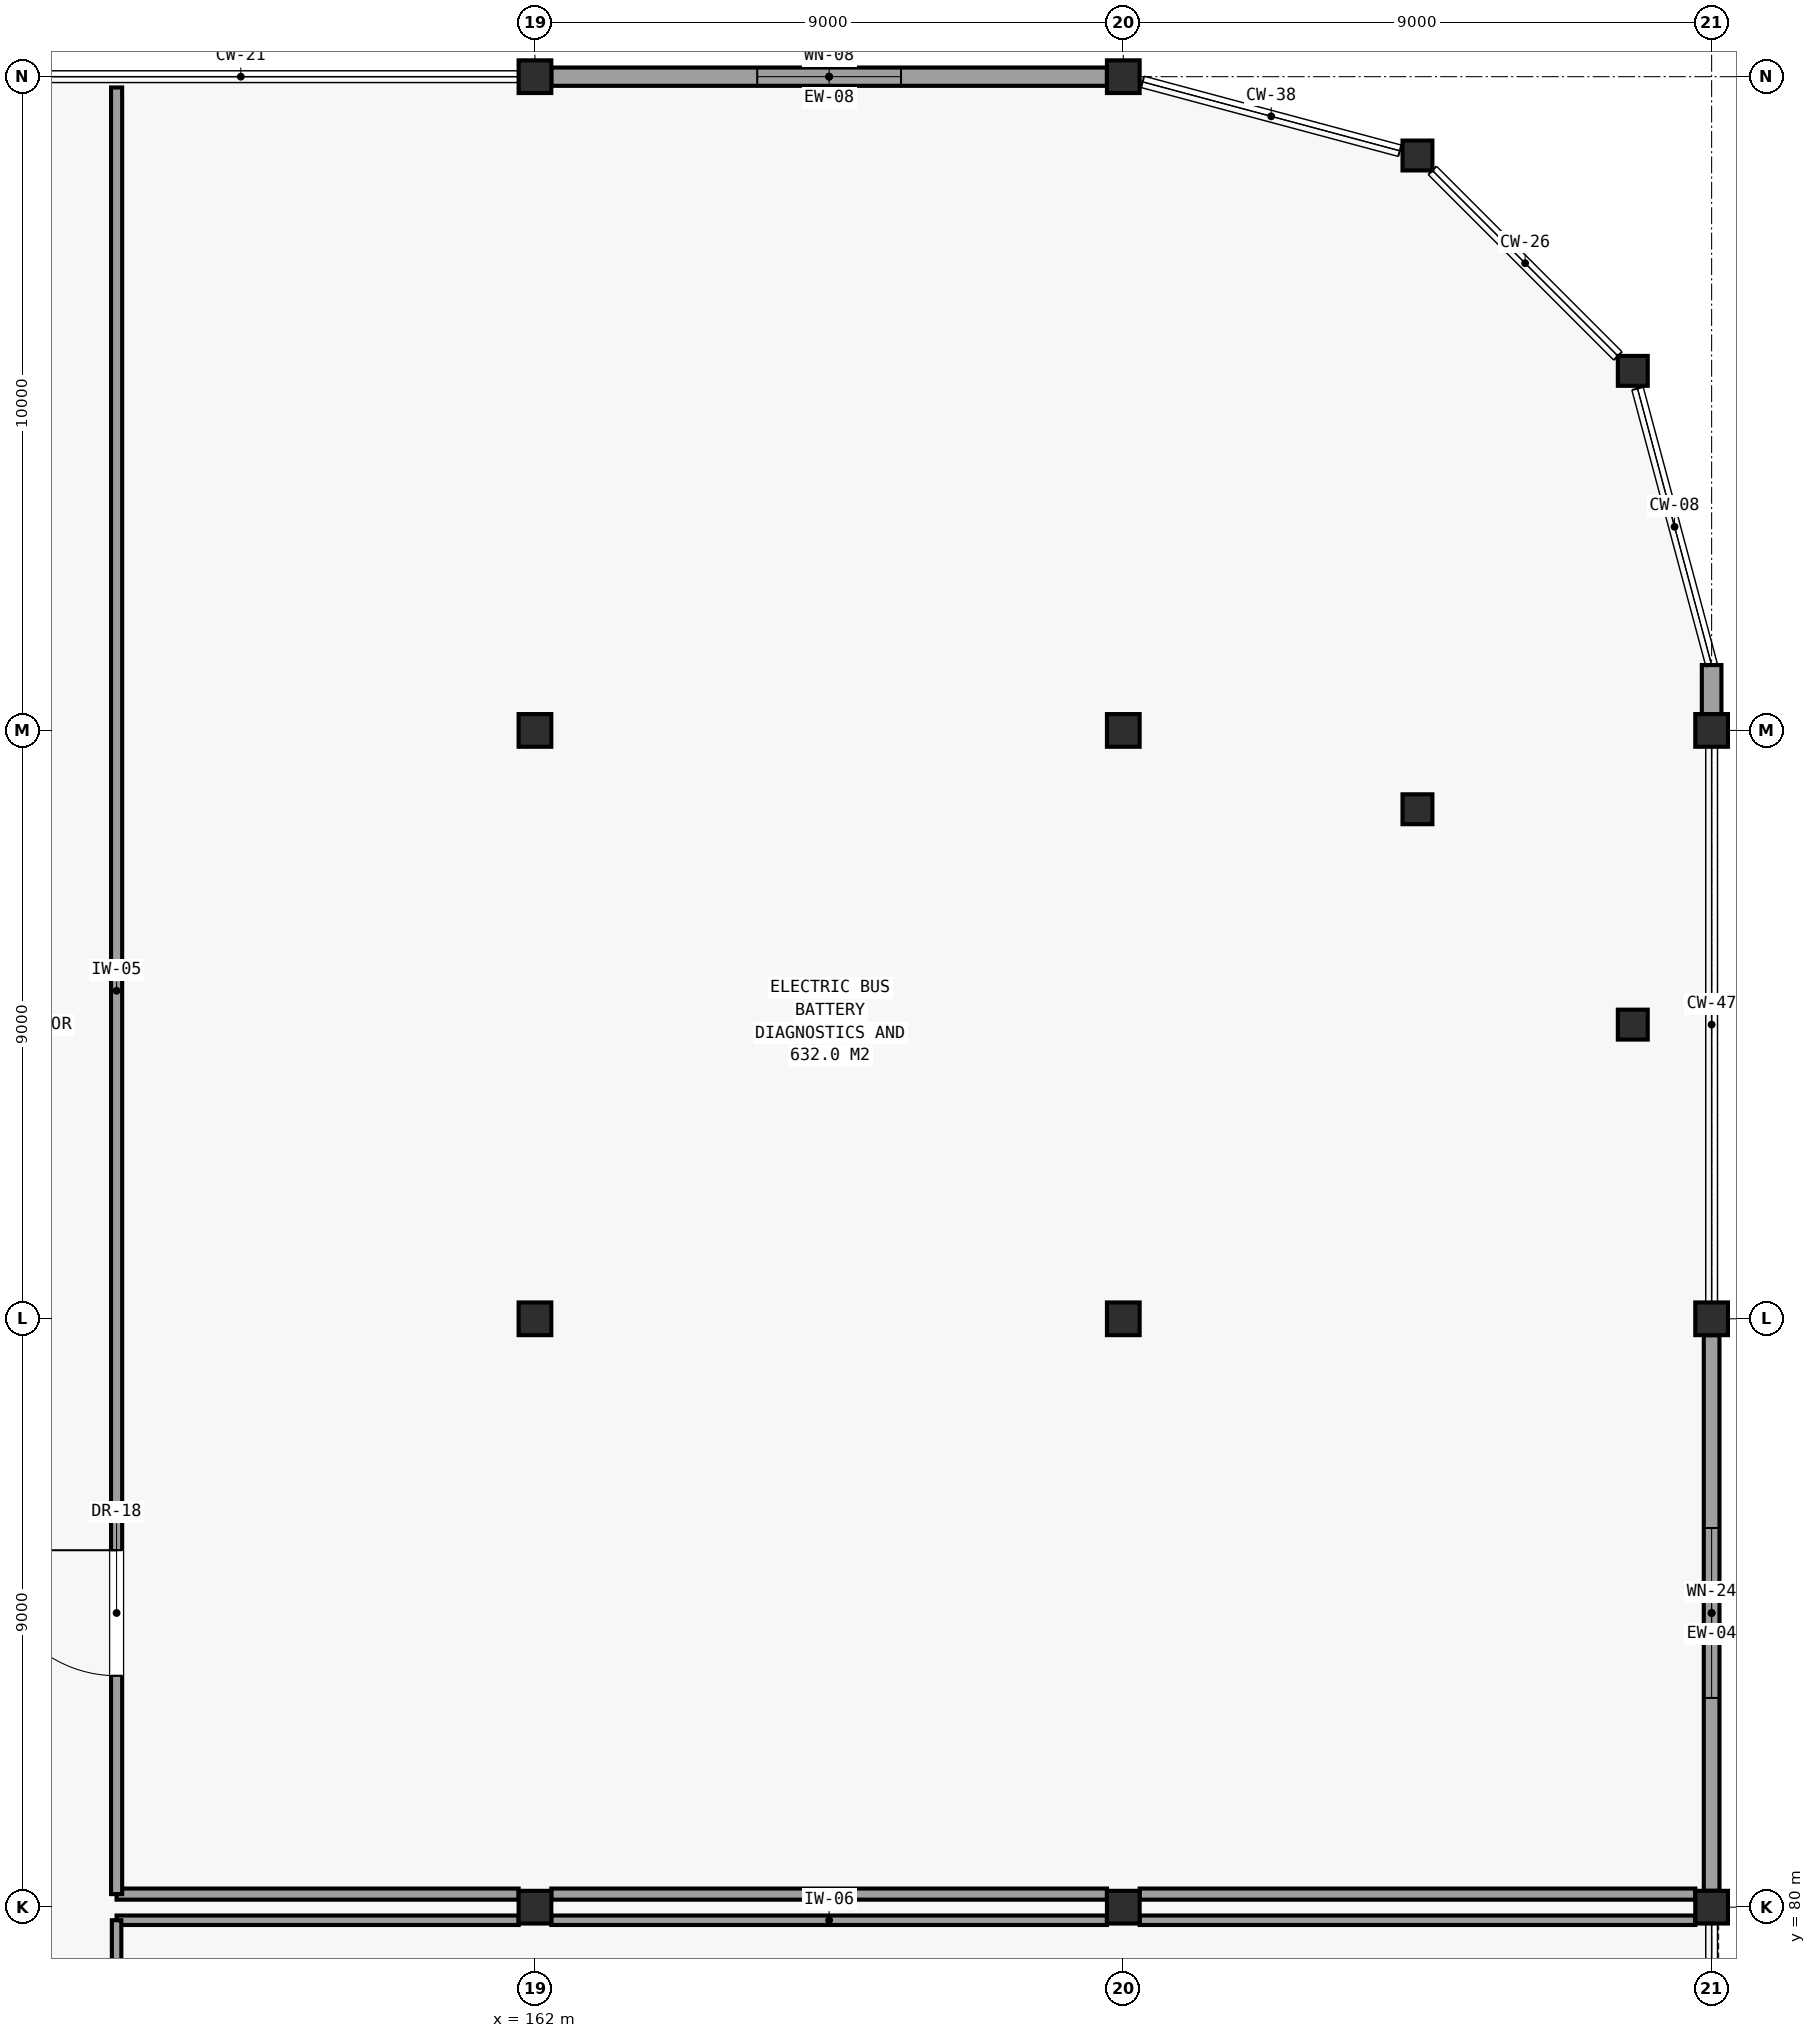
"""IFC4 building model, lengths in metres.
Left out: names, types, materials, properties, quantities, classifications, styles, units other than length and angle.
Written with IfcOpenShell. Run it as: python <this file> out.ifc"""

import sys

from ifc_helpers import new_model, si_unit, direction, frame, frame_2d, origin, origin_2d, place, context, subcontext, project, spatial, rectangle, hollow_rectangle, hollow_circle, extrude, element, fill, save


model = new_model("IFC4")
c1 = context("Model", 3, precision=1e-05, world=origin(), true_north=direction((0.0, 1.0)))
c2 = subcontext(c1, "Body", "Model", "MODEL_VIEW")
j1 = project(units=[si_unit("LENGTHUNIT", "METRE"), si_unit("PLANEANGLEUNIT", "RADIAN")], contexts=[c1])
p1 = place(None, origin())
s1 = spatial("IfcSite", under=j1, at=p1, CompositionType="ELEMENT")
p2 = place(p1, origin())
s2 = spatial("IfcBuilding", under=s1, at=p2, CompositionType="ELEMENT")
p3 = place(p2, origin())
s3 = spatial("IfcBuildingStorey", under=s2, at=p3, CompositionType="ELEMENT", Elevation=0.0)
for number, where, z_axis, x_axis in (
    (1, (162.0, 80.0, 0.0), (0.0, 0.0, 1.0), (1.0, 0.0, 0.0)),
    (2, (162.0, 89.0, 0.0), (0.0, 0.0, 1.0), (1.0, 0.0, 0.0)),
    (3, (162.0, 98.0, 0.0), (0.0, 0.0, 1.0), (1.0, 0.0, 0.0)),
    (4, (162.0, 108.0, 0.0), (0.0, 0.0, 1.0), (1.0, 0.0, 0.0)),
    (5, (171.0, 80.0, 0.0), (0.0, 0.0, 1.0), (1.0, 0.0, 0.0)),
    (6, (171.0, 89.0, 0.0), (0.0, 0.0, 1.0), (1.0, 0.0, 0.0)),
    (7, (171.0, 98.0, 0.0), (0.0, 0.0, 1.0), (1.0, 0.0, 0.0)),
    (8, (171.0, 108.0, 0.0), (0.0, 0.0, 1.0), (1.0, 0.0, 0.0)),
):
    element("IfcColumn", number, at=place(p3, frame(where, z_axis=z_axis, x_axis=x_axis)), inside=s3, PredefinedType="COLUMN", context=c2, shape_type="SweptSolid", body=[
        extrude(hollow_rectangle(XDim=0.5, YDim=0.5, WallThickness=0.025, at=origin_2d()), origin(), (0.0, 0.0, 1.0), 5.1),
    ])
for number, where, z_axis, x_axis in (
    (9, (175.5, 96.794, 0.0), (0.0, 0.0, 1.0), (1.0, 0.0, 0.0)),
    (10, (175.5, 106.794, 0.0), (0.0, 0.0, 1.0), (1.0, 0.0, 0.0)),
    (11, (178.794, 93.5, 0.0), (0.0, 0.0, 1.0), (1.0, 0.0, 0.0)),
    (12, (178.794, 103.5, 0.0), (0.0, 0.0, 1.0), (1.0, 0.0, 0.0)),
):
    element("IfcColumn", number, at=place(p3, frame(where, z_axis=z_axis, x_axis=x_axis)), inside=s3, PredefinedType="COLUMN", context=c2, shape_type="SweptSolid", body=[
        extrude(hollow_circle(Radius=0.229, WallThickness=0.016, at=origin_2d()), origin(), (0.0, 0.0, 1.0), 5.1),
    ])
for number, where, z_axis, x_axis in (
    (13, (180.0, 80.0, 0.0), (0.0, 0.0, 1.0), (1.0, 0.0, 0.0)),
    (14, (180.0, 89.0, 0.0), (0.0, 0.0, 1.0), (1.0, 0.0, 0.0)),
    (15, (180.0, 98.0, 0.0), (0.0, 0.0, 1.0), (1.0, 0.0, 0.0)),
):
    element("IfcColumn", number, at=place(p3, frame(where, z_axis=z_axis, x_axis=x_axis)), inside=s3, PredefinedType="COLUMN", context=c2, shape_type="SweptSolid", body=[
        extrude(hollow_rectangle(XDim=0.5, YDim=0.5, WallThickness=0.025, at=origin_2d()), origin(), (0.0, 0.0, 1.0), 5.1),
    ])
p4 = place(p3, frame((180.0, 80.25, 0.0), z_axis=(0.0, 0.0, 1.0), x_axis=(0.0, 1.0, 0.0)))
e16 = element("IfcWall", 16, at=p4, inside=s3, PredefinedType="SOLIDWALL", context=c2, shape_type="SweptSolid", body=[
    extrude(rectangle(XDim=8.5, YDim=0.24, at=frame_2d((4.25, 0.0))), origin(), (0.0, 0.0, 1.0), 4.44),
])
p5 = place(p4, frame((2.95, 0.0, 0.95)))
e17 = element("IfcOpeningElement", 17, at=p5, cuts=e16, PredefinedType="OPENING", context=c2, shape_type="SweptSolid", body=[
    extrude(rectangle(XDim=2.6, YDim=1.9, at=frame_2d((1.3, 0.95))), frame((0.0, 0.131, 0.0), z_axis=(0.0, -1.0, 0.0), x_axis=(1.0, 0.0, 0.0)), (0.0, 0.0, 1.0), 0.262),
])
p6 = place(p3, frame((180.0, 98.25, 0.0), z_axis=(0.0, 0.0, 1.0), x_axis=(0.0, 1.0, 0.0)))
e18 = element("IfcWall", 18, at=p6, inside=s3, PredefinedType="SOLIDWALL", context=c2, shape_type="SweptSolid", body=[
    extrude(rectangle(XDim=0.75, YDim=0.3, at=frame_2d((0.375, 0.0))), origin(), (0.0, 0.0, 1.0), 4.84),
])
p7 = place(p3, frame((170.75, 108.0, 0.0), z_axis=(0.0, 0.0, 1.0), x_axis=(-1.0, 0.0, 0.0)))
e19 = element("IfcWall", 19, at=p7, inside=s3, PredefinedType="SOLIDWALL", context=c2, shape_type="SweptSolid", body=[
    extrude(rectangle(XDim=8.5, YDim=0.28, at=frame_2d((4.25, 0.0))), origin(), (0.0, 0.0, 1.0), 4.252),
])
p8 = place(p7, frame((3.15, 0.0, 0.95)))
e20 = element("IfcOpeningElement", 20, at=p8, cuts=e19, PredefinedType="OPENING", context=c2, shape_type="SweptSolid", body=[
    extrude(rectangle(XDim=2.2, YDim=1.8, at=frame_2d((1.1, 0.9))), frame((0.0, 0.151, 0.0), z_axis=(0.0, -1.0, 0.0), x_axis=(1.0, 0.0, 0.0)), (0.0, 0.0, 1.0), 0.302),
])
p9 = place(p3, frame((155.6, 79.8, 0.0), z_axis=(0.0, 0.0, 1.0), x_axis=(1.0, 0.0, 0.0)))
e21 = element("IfcWall", 21, at=p9, inside=s3, PredefinedType="PARTITIONING", context=c2, shape_type="SweptSolid", body=[
    extrude(rectangle(XDim=6.15, YDim=0.145, at=frame_2d((3.075, 0.0))), origin(), (0.0, 0.0, 1.0), 4.19),
])
for number, where, z_axis, x_axis in (
    (22, (162.25, 79.8, 0.0), (0.0, 0.0, 1.0), (1.0, 0.0, 0.0)),
    (23, (171.25, 79.8, 0.0), (0.0, 0.0, 1.0), (1.0, 0.0, 0.0)),
):
    element("IfcWall", number, at=place(p3, frame(where, z_axis=z_axis, x_axis=x_axis)), inside=s3, PredefinedType="PARTITIONING", context=c2, shape_type="SweptSolid", body=[
        extrude(rectangle(XDim=8.5, YDim=0.145, at=frame_2d((4.25, 0.0))), origin(), (0.0, 0.0, 1.0), 4.19),
    ])
p10 = place(p3, frame((155.6, 62.2, 0.0), z_axis=(0.0, 0.0, 1.0), x_axis=(0.0, 1.0, 0.0)))
e24 = element("IfcWall", 24, at=p10, inside=s3, PredefinedType="PARTITIONING", context=c2, shape_type="SweptSolid", body=[
    extrude(rectangle(XDim=17.6, YDim=0.145, at=frame_2d((8.8, 0.0))), origin(), (0.0, 0.0, 1.0), 4.252),
])
p11 = place(p10, frame((12.39, 0.0, 0.0)))
e25 = element("IfcOpeningElement", 25, at=p11, cuts=e24, PredefinedType="OPENING", context=c2, shape_type="SweptSolid", body=[
    extrude(rectangle(XDim=1.82, YDim=2.45, at=frame_2d((0.91, 1.225))), frame((0.0, 0.083, 0.0), z_axis=(0.0, -1.0, 0.0), x_axis=(1.0, 0.0, 0.0)), (0.0, 0.0, 1.0), 0.167),
])
p12 = place(p3, frame((155.6, 80.2, 0.0), z_axis=(0.0, 0.0, 1.0), x_axis=(1.0, 0.0, 0.0)))
e26 = element("IfcWall", 26, at=p12, inside=s3, PredefinedType="PARTITIONING", context=c2, shape_type="SweptSolid", body=[
    extrude(rectangle(XDim=6.15, YDim=0.17, at=frame_2d((3.075, 0.0))), origin(), (0.0, 0.0, 1.0), 4.19),
])
for number, where, z_axis, x_axis in (
    (27, (162.25, 80.2, 0.0), (0.0, 0.0, 1.0), (1.0, 0.0, 0.0)),
    (28, (171.25, 80.2, 0.0), (0.0, 0.0, 1.0), (1.0, 0.0, 0.0)),
):
    element("IfcWall", number, at=place(p3, frame(where, z_axis=z_axis, x_axis=x_axis)), inside=s3, PredefinedType="PARTITIONING", context=c2, shape_type="SweptSolid", body=[
        extrude(rectangle(XDim=8.5, YDim=0.17, at=frame_2d((4.25, 0.0))), origin(), (0.0, 0.0, 1.0), 4.19),
    ])
p13 = place(p3, frame((155.6, 80.2, 0.0), z_axis=(0.0, 0.0, 1.0), x_axis=(0.0, 1.0, 0.0)))
e29 = element("IfcWall", 29, at=p13, inside=s3, PredefinedType="PARTITIONING", context=c2, shape_type="SweptSolid", body=[
    extrude(rectangle(XDim=27.635, YDim=0.17, at=frame_2d((13.817, 0.0))), origin(), (0.0, 0.0, 1.0), 4.252),
])
p14 = place(p13, frame((3.34, 0.0, 0.0)))
e30 = element("IfcOpeningElement", 30, at=p14, cuts=e29, PredefinedType="OPENING", context=c2, shape_type="SweptSolid", body=[
    extrude(rectangle(XDim=1.92, YDim=2.45, at=frame_2d((0.96, 1.225))), frame((0.0, 0.096, 0.0), z_axis=(0.0, -1.0, 0.0), x_axis=(1.0, 0.0, 0.0)), (0.0, 0.0, 1.0), 0.192),
])
p15 = place(p5, origin())
e31 = element("IfcWindow", 31, at=p15, inside=s3, PartitioningType="SINGLE_PANEL", PredefinedType="WINDOW", context=c2, shape_type="SweptSolid", body=[
    extrude(rectangle(XDim=2.6, YDim=1.9, at=frame_2d((1.3, 0.95))), frame((0.0, 0.03, 0.0), z_axis=(0.0, -1.0, 0.0), x_axis=(1.0, 0.0, 0.0)), (0.0, 0.0, 1.0), 0.06),
])
fill(e17, e31)
p16 = place(p8, origin())
e32 = element("IfcWindow", 32, at=p16, inside=s3, PartitioningType="SINGLE_PANEL", PredefinedType="WINDOW", context=c2, shape_type="SweptSolid", body=[
    extrude(rectangle(XDim=2.2, YDim=1.8, at=frame_2d((1.1, 0.9))), frame((0.0, 0.03, 0.0), z_axis=(0.0, -1.0, 0.0), x_axis=(1.0, 0.0, 0.0)), (0.0, 0.0, 1.0), 0.06),
])
fill(e20, e32)
p17 = place(p14, origin())
e33 = element("IfcDoor", 33, at=p17, inside=s3, OperationType="SINGLE_SWING_RIGHT", PredefinedType="DOOR", context=c2, shape_type="SweptSolid", body=[
    extrude(rectangle(XDim=1.92, YDim=2.45, at=frame_2d((0.96, 1.225))), frame((0.0, 0.025, 0.0), z_axis=(0.0, -1.0, 0.0), x_axis=(1.0, 0.0, 0.0)), (0.0, 0.0, 1.0), 0.05),
])
fill(e30, e33)
save(model, sys.argv[1])
